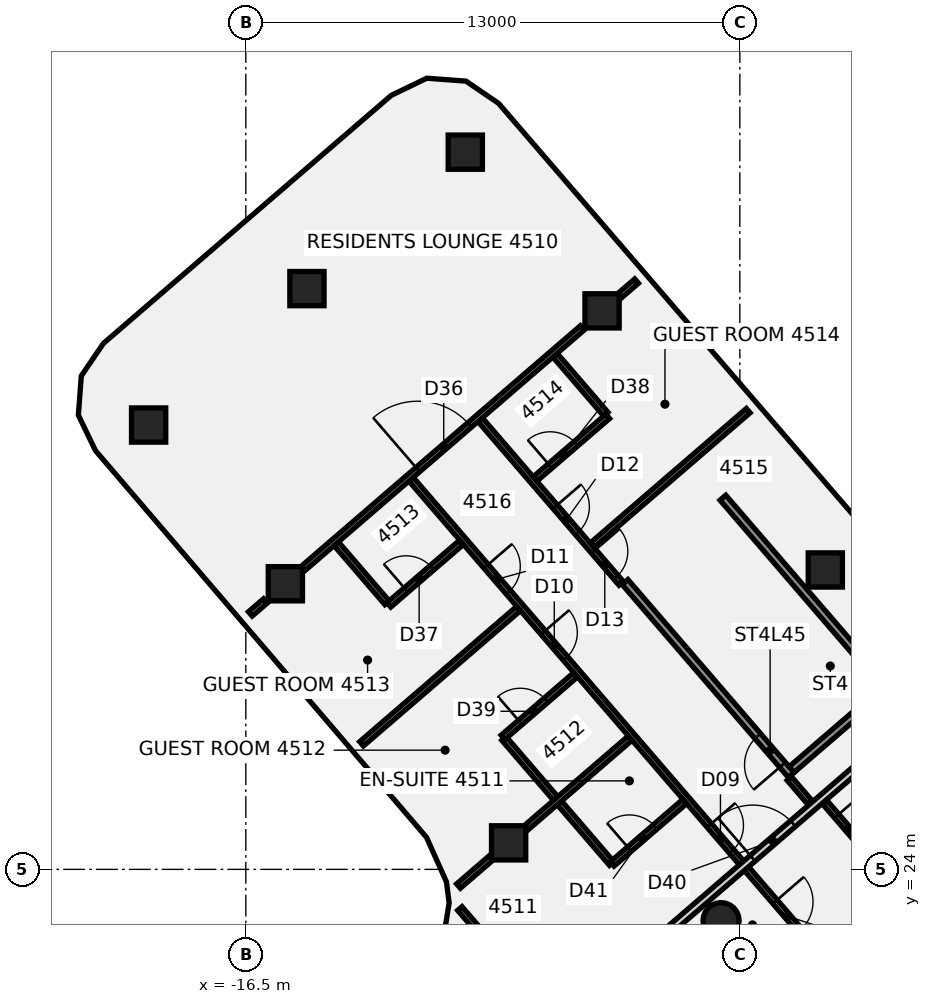
"""IFC4 building model, lengths in metres.
Left out: names, types, materials, properties, quantities, classifications, styles, units other than length and angle.
Written with IfcOpenShell. Run it as: python <this file> out.ifc"""

import sys

from ifc_helpers import new_model, si_unit, direction, frame, frame_2d, origin, origin_2d, place, context, subcontext, project, spatial, polyline, rectangle, circle, outline, extrude, element, fill, save


model = new_model("IFC4")
c1 = context("Model", 3, precision=1e-05, world=origin(), true_north=direction((0.0, 1.0)))
c2 = subcontext(c1, "Body", "Model", "MODEL_VIEW")
j1 = project(units=[si_unit("LENGTHUNIT", "METRE"), si_unit("PLANEANGLEUNIT", "RADIAN")], contexts=[c1])
p1 = place(None, origin())
s1 = spatial("IfcSite", under=j1, at=p1, CompositionType="ELEMENT")
p2 = place(p1, origin())
s2 = spatial("IfcBuilding", under=s1, at=p2, CompositionType="ELEMENT")
p3 = place(p2, frame((0.0, 0.0, 182.5)))
s3 = spatial("IfcBuildingStorey", under=s2, at=p3, CompositionType="ELEMENT", Elevation=182.5)
p4 = place(p3, frame((-3.994, 22.651, -0.14), z_axis=(0.0, 0.0, 1.0), x_axis=(1.0, 0.0, 0.0)))
e1 = element("IfcColumn", 1, at=p4, inside=s3, PredefinedType="COLUMN", context=c2, shape_type="SweptSolid", body=[
    extrude(circle(Radius=0.475, at=origin_2d()), origin(), (0.0, 0.0, 1.0), 3.6),
])
p5 = place(p3, frame((-15.459, 31.516, -0.133), z_axis=(-0.047319070379, -0.07839124964, 0.995799034725), x_axis=(0.755788776181, 0.649009542698, 0.087005398028)))
e2 = element("IfcColumn", 2, at=p5, inside=s3, PredefinedType="COLUMN", context=c2, shape_type="SweptSolid", body=[
    extrude(rectangle(XDim=0.9, YDim=0.9, at=origin_2d()), origin(), (0.0, 0.0, 1.0), 3.606),
])
p6 = place(p3, frame((-7.126, 38.696, -0.133), z_axis=(-0.083863399406, -0.036686006843, 0.995801720797), x_axis=(0.651508924479, -0.758162598415, 0.026936883435)))
e3 = element("IfcColumn", 3, at=p6, inside=s3, PredefinedType="COLUMN", context=c2, shape_type="SweptSolid", body=[
    extrude(rectangle(XDim=0.9, YDim=0.9, at=origin_2d()), origin(), (0.0, 0.0, 1.0), 3.607),
])
p7 = place(p3, frame((-9.584, 24.698, -0.135), z_axis=(-0.013229584391, -0.048576320124, 0.998731855515), x_axis=(0.757717932984, 0.651247732409, 0.04171240903)))
e4 = element("IfcColumn", 4, at=p7, inside=s3, PredefinedType="COLUMN", context=c2, shape_type="SweptSolid", body=[
    extrude(rectangle(XDim=0.9, YDim=0.9, at=origin_2d()), origin(), (0.0, 0.0, 1.0), 3.599),
])
p8 = place(p3, frame((-1.251, 31.878, -0.135), z_axis=(-0.049929700814, -0.006783926741, 0.99872969482), x_axis=(0.652013787216, -0.757710068374, 0.027449472935)))
e5 = element("IfcColumn", 5, at=p8, inside=s3, PredefinedType="COLUMN", context=c2, shape_type="SweptSolid", body=[
    extrude(rectangle(XDim=0.9, YDim=0.9, at=origin_2d()), origin(), (0.0, 0.0, 1.0), 3.599),
])
p9 = place(p3, frame((-10.725, 42.871, -0.125), z_axis=(-0.05897537844, -0.10577694023, 0.992639483223), x_axis=(0.75438904644, 0.6465033883, 0.113712512625)))
e6 = element("IfcColumn", 6, at=p9, inside=s3, PredefinedType="COLUMN", context=c2, shape_type="SweptSolid", body=[
    extrude(rectangle(XDim=0.9, YDim=0.9, at=origin_2d()), origin(), (0.0, 0.0, 1.0), 3.61),
])
p10 = place(p3, frame((-14.891, 39.281, -0.126), z_axis=(-0.040639705862, -0.12637463351, 0.99114976987), x_axis=(0.755269902041, 0.645550569996, 0.113277697048)))
e7 = element("IfcColumn", 7, at=p10, inside=s3, PredefinedType="COLUMN", context=c2, shape_type="SweptSolid", body=[
    extrude(rectangle(XDim=0.9, YDim=0.9, at=origin_2d()), origin(), (0.0, 0.0, 1.0), 3.616),
])
p11 = place(p3, frame((-19.058, 35.691, -0.128), z_axis=(-0.022351267372, -0.146831669094, 0.988908935038), x_axis=(0.756181261603, 0.644567349154, 0.112795531851)))
e8 = element("IfcColumn", 8, at=p11, inside=s3, PredefinedType="COLUMN", context=c2, shape_type="SweptSolid", body=[
    extrude(rectangle(XDim=0.9, YDim=0.9, at=origin_2d()), origin(), (0.0, 0.0, 1.0), 3.626),
])
p12 = place(p3, frame((-14.119, 32.565, 0.0), z_axis=(0.0, 0.0, 1.0), x_axis=(0.652696376995, -0.757619587562, 0.0)))
e9 = element("IfcWall", 9, at=p12, inside=s3, PredefinedType="PARTITIONING", context=c2, shape_type="SweptSolid", body=[
    extrude(rectangle(XDim=2.045, YDim=0.15, at=frame_2d((1.023, 0.0))), origin(), (0.0, 0.0, 1.0), 2.864),
])
p13 = place(p3, frame((-9.706, 27.443, 0.0), z_axis=(0.0, 0.0, 1.0), x_axis=(0.652665803923, -0.757645925475, 0.0)))
e10 = element("IfcWall", 10, at=p13, inside=s3, PredefinedType="PARTITIONING", context=c2, shape_type="SweptSolid", body=[
    extrude(rectangle(XDim=4.34, YDim=0.15, at=frame_2d((2.17, 0.0))), origin(), (0.0, 0.0, 1.0), 2.864),
])
p14 = place(p3, frame((-12.149, 34.262, 0.0), z_axis=(0.0, 0.0, 1.0), x_axis=(0.652651241908, -0.75765846952, 0.0)))
e11 = element("IfcWall", 11, at=p14, inside=s3, PredefinedType="PARTITIONING", context=c2, shape_type="SweptSolid", body=[
    extrude(rectangle(XDim=15.745, YDim=0.15, at=frame_2d((7.873, 0.0))), origin(), (0.0, 0.0, 1.0), 2.864),
])
p15 = place(p14, frame((14.67, 0.0, 0.0)))
e12 = element("IfcOpeningElement", 12, at=p15, cuts=e11, PredefinedType="OPENING", context=c2, shape_type="SweptSolid", body=[
    extrude(rectangle(XDim=1.0, YDim=2.1, at=frame_2d((0.5, 1.05))), frame((0.0, 0.085, 0.0), z_axis=(0.0, -1.0, 0.0), x_axis=(1.0, 0.0, 0.0)), (0.0, 0.0, 1.0), 0.17),
])
p16 = place(p14, frame((12.02, 0.0, 0.0)))
e13 = element("IfcOpeningElement", 13, at=p16, cuts=e11, PredefinedType="OPENING", context=c2, shape_type="SweptSolid", body=[
    extrude(rectangle(XDim=0.9, YDim=2.1, at=frame_2d((0.45, 1.05))), frame((0.0, 0.085, 0.0), z_axis=(0.0, -1.0, 0.0), x_axis=(1.0, 0.0, 0.0)), (0.0, 0.0, 1.0), 0.17),
])
p17 = place(p14, frame((5.32, 0.0, 0.0)))
e14 = element("IfcOpeningElement", 14, at=p17, cuts=e11, PredefinedType="OPENING", context=c2, shape_type="SweptSolid", body=[
    extrude(rectangle(XDim=0.9, YDim=2.1, at=frame_2d((0.45, 1.05))), frame((0.0, 0.085, 0.0), z_axis=(0.0, -1.0, 0.0), x_axis=(1.0, 0.0, 0.0)), (0.0, 0.0, 1.0), 0.17),
])
p18 = place(p14, frame((3.02, 0.0, 0.0)))
e15 = element("IfcOpeningElement", 15, at=p18, cuts=e11, PredefinedType="OPENING", context=c2, shape_type="SweptSolid", body=[
    extrude(rectangle(XDim=0.9, YDim=2.1, at=frame_2d((0.45, 1.05))), frame((0.0, 0.085, 0.0), z_axis=(0.0, -1.0, 0.0), x_axis=(1.0, 0.0, 0.0)), (0.0, 0.0, 1.0), 0.17),
])
p19 = place(p3, frame((-10.868, 22.97, 0.0), z_axis=(0.0, 0.0, 1.0), x_axis=(0.652748053076, -0.757575065063, 0.0)))
e16 = element("IfcWall", 16, at=p19, inside=s3, PredefinedType="PARTITIONING", context=c2, shape_type="SweptSolid", body=[
    extrude(rectangle(XDim=14.472, YDim=0.15, at=frame_2d((7.236, 0.0))), origin(), (0.0, 0.0, 1.0), 2.864),
])
p20 = place(p3, frame((-10.331, 35.829, 0.0), z_axis=(0.0, 0.0, 1.0), x_axis=(0.652721930007, -0.757597572652, 0.0)))
e17 = element("IfcWall", 17, at=p20, inside=s3, PredefinedType="PARTITIONING", context=c2, shape_type="SweptSolid", body=[
    extrude(rectangle(XDim=5.68, YDim=0.15, at=frame_2d((2.84, 0.0))), origin(), (0.0, 0.0, 1.0), 2.864),
])
p21 = place(p20, frame((3.02, 0.0, 0.0)))
e18 = element("IfcOpeningElement", 18, at=p21, cuts=e17, PredefinedType="OPENING", context=c2, shape_type="SweptSolid", body=[
    extrude(rectangle(XDim=0.9, YDim=2.1, at=frame_2d((0.45, 1.05))), frame((0.0, 0.085, 0.0), z_axis=(0.0, -1.0, 0.0), x_axis=(1.0, 0.0, 0.0)), (0.0, 0.0, 1.0), 0.17),
])
p22 = place(p20, frame((4.57, 0.0, 0.0)))
e19 = element("IfcOpeningElement", 19, at=p22, cuts=e17, PredefinedType="OPENING", context=c2, shape_type="SweptSolid", body=[
    extrude(rectangle(XDim=0.9, YDim=2.1, at=frame_2d((0.45, 1.05))), frame((0.0, 0.085, 0.0), z_axis=(0.0, -1.0, 0.0), x_axis=(1.0, 0.0, 0.0)), (0.0, 0.0, 1.0), 0.17),
])
p23 = place(p3, frame((-2.198, 26.39, 0.0), z_axis=(0.0, 0.0, 1.0), x_axis=(0.652726981175, -0.757593220697, 0.0)))
e20 = element("IfcWall", 20, at=p23, inside=s3, PredefinedType="PARTITIONING", context=c2, shape_type="SweptSolid", body=[
    extrude(rectangle(XDim=0.84, YDim=0.15, at=frame_2d((0.42, 0.0))), origin(), (0.0, 0.0, 1.0), 2.864),
])
p24 = place(p3, frame((-8.361, 37.526, 0.0), z_axis=(0.0, 0.0, 1.0), x_axis=(0.652696376995, -0.757619587562, 0.0)))
e21 = element("IfcWall", 21, at=p24, inside=s3, PredefinedType="PARTITIONING", context=c2, shape_type="SweptSolid", body=[
    extrude(rectangle(XDim=2.045, YDim=0.15, at=frame_2d((1.023, 0.0))), origin(), (0.0, 0.0, 1.0), 2.864),
])
p25 = place(p3, frame((-1.266, 25.767, 0.0), z_axis=(0.0, 0.0, 1.0), x_axis=(0.652880885414, -0.757460592679, 0.0)))
e22 = element("IfcWall", 22, at=p25, inside=s3, PredefinedType="PARTITIONING", context=c2, shape_type="SweptSolid", body=[
    extrude(rectangle(XDim=2.22, YDim=0.15, at=frame_2d((1.11, 0.0))), origin(), (0.0, 0.0, 1.0), 2.864),
])
p26 = place(p25, frame((0.48, 0.0, 0.0)))
e23 = element("IfcOpeningElement", 23, at=p26, cuts=e22, PredefinedType="OPENING", context=c2, shape_type="SweptSolid", body=[
    extrude(rectangle(XDim=0.9, YDim=2.1, at=frame_2d((0.45, 1.05))), frame((0.0, 0.085, 0.0), z_axis=(0.0, -1.0, 0.0), x_axis=(1.0, 0.0, 0.0)), (0.0, 0.0, 1.0), 0.17),
])
p27 = place(p3, frame((-16.381, 30.722, 0.0), z_axis=(0.0, 0.0, 1.0), x_axis=(0.757409961601, 0.652939622069, 0.0)))
e24 = element("IfcWall", 24, at=p27, inside=s3, PredefinedType="PARTITIONING", context=c2, shape_type="SweptSolid", body=[
    extrude(rectangle(XDim=0.523, YDim=0.15, at=frame_2d((0.262, 0.0))), origin(), (0.0, 0.0, 1.0), 2.864),
])
p28 = place(p3, frame((-15.177, 31.759, 0.0), z_axis=(0.0, 0.0, 1.0), x_axis=(0.757593369708, 0.652726808224, 0.0)))
e25 = element("IfcWall", 25, at=p28, inside=s3, PredefinedType="PARTITIONING", context=c2, shape_type="SweptSolid", body=[
    extrude(rectangle(XDim=9.941, YDim=0.15, at=frame_2d((4.97, 0.0))), origin(), (0.0, 0.0, 1.0), 2.864),
])
p29 = place(p28, frame((4.229, 0.0, 0.0)))
e26 = element("IfcOpeningElement", 26, at=p29, cuts=e25, PredefinedType="OPENING", context=c2, shape_type="SweptSolid", body=[
    extrude(rectangle(XDim=1.8, YDim=2.1, at=frame_2d((0.9, 1.05))), frame((0.0, 0.085, 0.0), z_axis=(0.0, -1.0, 0.0), x_axis=(1.0, 0.0, 0.0)), (0.0, 0.0, 1.0), 0.17),
])
p30 = place(p3, frame((-6.839, 38.943, 0.0), z_axis=(0.0, 0.0, 1.0), x_axis=(0.757658475541, 0.652651234918, 0.0)))
e27 = element("IfcWall", 27, at=p30, inside=s3, PredefinedType="PARTITIONING", context=c2, shape_type="SweptSolid", body=[
    extrude(rectangle(XDim=0.821, YDim=0.15, at=frame_2d((0.41, 0.0))), origin(), (0.0, 0.0, 1.0), 2.864),
])
p31 = place(p3, frame((-13.455, 27.303, 0.0), z_axis=(0.0, 0.0, 1.0), x_axis=(0.757581773841, 0.652740266832, 0.0)))
e28 = element("IfcWall", 28, at=p31, inside=s3, PredefinedType="PARTITIONING", context=c2, shape_type="SweptSolid", body=[
    extrude(rectangle(XDim=5.451, YDim=0.15, at=frame_2d((2.726, 0.0))), origin(), (0.0, 0.0, 1.0), 2.864),
])
p32 = place(p3, frame((-7.385, 32.533, 0.0), z_axis=(0.0, 0.0, 1.0), x_axis=(0.757581269408, 0.652740852286, 0.0)))
e29 = element("IfcWall", 29, at=p32, inside=s3, PredefinedType="PARTITIONING", context=c2, shape_type="SweptSolid", body=[
    extrude(rectangle(XDim=5.419, YDim=0.15, at=frame_2d((2.709, 0.0))), origin(), (0.0, 0.0, 1.0), 2.864),
])
p33 = place(p3, frame((-12.735, 30.959, 0.0), z_axis=(0.0, 0.0, 1.0), x_axis=(0.757661014591, 0.652648287341, 0.0)))
e30 = element("IfcWall", 30, at=p33, inside=s3, PredefinedType="PARTITIONING", context=c2, shape_type="SweptSolid", body=[
    extrude(rectangle(XDim=2.52, YDim=0.15, at=frame_2d((1.26, 0.0))), origin(), (0.0, 0.0, 1.0), 2.864),
])
p34 = place(p33, frame((0.6, 0.0, 0.0)))
e31 = element("IfcOpeningElement", 31, at=p34, cuts=e30, PredefinedType="OPENING", context=c2, shape_type="SweptSolid", body=[
    extrude(rectangle(XDim=0.9, YDim=2.1, at=frame_2d((0.45, 1.05))), frame((0.0, 0.085, 0.0), z_axis=(0.0, -1.0, 0.0), x_axis=(1.0, 0.0, 0.0)), (0.0, 0.0, 1.0), 0.17),
])
p35 = place(p3, frame((-8.886, 34.275, 0.0), z_axis=(0.0, 0.0, 1.0), x_axis=(0.757661014591, 0.652648287341, 0.0)))
e32 = element("IfcWall", 32, at=p35, inside=s3, PredefinedType="PARTITIONING", context=c2, shape_type="SweptSolid", body=[
    extrude(rectangle(XDim=2.52, YDim=0.15, at=frame_2d((1.26, 0.0))), origin(), (0.0, 0.0, 1.0), 2.864),
])
p36 = place(p35, frame((0.52, 0.0, 0.0)))
e33 = element("IfcOpeningElement", 33, at=p36, cuts=e32, PredefinedType="OPENING", context=c2, shape_type="SweptSolid", body=[
    extrude(rectangle(XDim=0.9, YDim=2.1, at=frame_2d((0.45, 1.05))), frame((0.0, 0.085, 0.0), z_axis=(0.0, -1.0, 0.0), x_axis=(1.0, 0.0, 0.0)), (0.0, 0.0, 1.0), 0.17),
])
p37 = place(p3, frame((-10.904, 23.561, 0.0), z_axis=(0.0, 0.0, 1.0), x_axis=(0.757575802877, 0.652747196773, 0.0)))
e34 = element("IfcWall", 34, at=p37, inside=s3, PredefinedType="PARTITIONING", context=c2, shape_type="SweptSolid", body=[
    extrude(rectangle(XDim=1.13, YDim=0.15, at=frame_2d((0.565, 0.0))), origin(), (0.0, 0.0, 1.0), 2.864),
])
p38 = place(p3, frame((-9.24, 24.994, 0.0), z_axis=(0.0, 0.0, 1.0), x_axis=(0.757602279322, 0.652716467056, 0.0)))
e35 = element("IfcWall", 35, at=p38, inside=s3, PredefinedType="PARTITIONING", context=c2, shape_type="SweptSolid", body=[
    extrude(rectangle(XDim=3.766, YDim=0.15, at=frame_2d((1.883, 0.0))), origin(), (0.0, 0.0, 1.0), 2.864),
])
p39 = place(p3, frame((-9.732, 27.474, 0.0), z_axis=(0.0, 0.0, 1.0), x_axis=(0.757495885979, 0.652839936528, 0.0)))
e36 = element("IfcWall", 36, at=p39, inside=s3, PredefinedType="PARTITIONING", context=c2, shape_type="SweptSolid", body=[
    extrude(rectangle(XDim=2.52, YDim=0.15, at=frame_2d((1.26, 0.0))), origin(), (0.0, 0.0, 1.0), 2.864),
])
p40 = place(p39, frame((0.6, 0.0, 0.0)))
e37 = element("IfcOpeningElement", 37, at=p40, cuts=e36, PredefinedType="OPENING", context=c2, shape_type="SweptSolid", body=[
    extrude(rectangle(XDim=0.9, YDim=2.1, at=frame_2d((0.45, 1.05))), frame((0.0, 0.085, 0.0), z_axis=(0.0, -1.0, 0.0), x_axis=(1.0, 0.0, 0.0)), (0.0, 0.0, 1.0), 0.17),
])
p41 = place(p3, frame((-8.177, 19.97, 0.0), z_axis=(0.0, 0.0, 1.0), x_axis=(0.757604641141, 0.652713725704, 0.0)))
e38 = element("IfcWall", 38, at=p41, inside=s3, PredefinedType="PARTITIONING", context=c2, shape_type="SweptSolid", body=[
    extrude(rectangle(XDim=14.219, YDim=0.2, at=frame_2d((7.109, 0.0))), origin(), (0.0, 0.0, 1.0), 2.864),
])
p42 = place(p41, frame((6.621, 0.0, 0.0)))
e39 = element("IfcOpeningElement", 39, at=p42, cuts=e38, PredefinedType="OPENING", context=c2, shape_type="SweptSolid", body=[
    extrude(rectangle(XDim=1.4, YDim=2.1, at=frame_2d((0.7, 1.05))), frame((0.0, 0.11, 0.0), z_axis=(0.0, -1.0, 0.0), x_axis=(1.0, 0.0, 0.0)), (0.0, 0.0, 1.0), 0.22),
])
p43 = place(p3, frame((-6.86, 24.141, 0.0), z_axis=(0.0, 0.0, 1.0), x_axis=(0.757495885979, 0.652839936528, 0.0)))
e40 = element("IfcWall", 40, at=p43, inside=s3, PredefinedType="PARTITIONING", context=c2, shape_type="SweptSolid", body=[
    extrude(rectangle(XDim=2.52, YDim=0.15, at=frame_2d((1.26, 0.0))), origin(), (0.0, 0.0, 1.0), 2.864),
])
p44 = place(p43, frame((0.6, 0.0, 0.0)))
e41 = element("IfcOpeningElement", 41, at=p44, cuts=e40, PredefinedType="OPENING", context=c2, shape_type="SweptSolid", body=[
    extrude(rectangle(XDim=0.9, YDim=2.1, at=frame_2d((0.45, 1.05))), frame((0.0, 0.085, 0.0), z_axis=(0.0, -1.0, 0.0), x_axis=(1.0, 0.0, 0.0)), (0.0, 0.0, 1.0), 0.17),
])
p45 = place(p3, frame((-2.148, 26.485, -0.14), z_axis=(0.0, 0.0, 1.0), x_axis=(-0.6527428112, 0.75757958158, 0.0)))
e42 = element("IfcWall", 42, at=p45, inside=s3, PredefinedType="SHEAR", context=c2, shape_type="SweptSolid", body=[
    extrude(rectangle(XDim=6.7, YDim=0.2, at=frame_2d((3.35, 0.0))), origin(), (0.0, 0.0, 1.0), 3.004),
])
p46 = place(p45, frame((0.35, 0.0, 0.0)))
e43 = element("IfcOpeningElement", 43, at=p46, cuts=e42, PredefinedType="OPENING", context=c2, shape_type="SweptSolid", body=[
    extrude(rectangle(XDim=1.0, YDim=2.1, at=frame_2d((0.5, 1.05))), frame((0.0, 0.11, 0.0), z_axis=(0.0, -1.0, 0.0), x_axis=(1.0, 0.0, 0.0)), (0.0, 0.0, 1.0), 0.22),
])
p47 = place(p3, frame((0.427, 28.704, -0.14), z_axis=(0.0, 0.0, 1.0), x_axis=(-0.652703877257, 0.757613125952, 0.0)))
e44 = element("IfcWall", 44, at=p47, inside=s3, PredefinedType="SHEAR", context=c2, shape_type="SweptSolid", body=[
    extrude(rectangle(XDim=6.7, YDim=0.2, at=frame_2d((3.35, 0.0))), origin(), (0.0, 0.0, 1.0), 3.004),
])
p48 = place(p3, frame((0.287, 28.715, -0.14), z_axis=(0.0, 0.0, 1.0), x_axis=(-0.757611592596, -0.652705657065, 0.0)))
e45 = element("IfcWall", 45, at=p48, inside=s3, PredefinedType="SHEAR", context=c2, shape_type="SweptSolid", body=[
    extrude(rectangle(XDim=3.2, YDim=0.2, at=frame_2d((1.6, 0.0))), origin(), (0.0, 0.0, 1.0), 3.004),
])
p49 = place(p3, frame((0.0, 0.0, -0.14)))
e46 = element("IfcWall", 46, at=p49, inside=s3, PredefinedType="SHEAR", context=c2, shape_type="SweptSolid", body=[
    extrude(outline(polyline([(-3.891, 33.563), (-4.021, 33.715), (-6.446, 31.626), (-6.315, 31.475), (-3.891, 33.563)])), origin(), (0.0, 0.0, 1.0), 3.004),
])
p50 = place(p15, frame((1.0, 0.0, 0.0), z_axis=(0.0, 0.0, 1.0), x_axis=(-1.0, 0.0, 0.0)))
e47 = element("IfcDoor", 47, at=p50, inside=s3, OperationType="SINGLE_SWING_RIGHT", PredefinedType="DOOR", context=c2, shape_type="SweptSolid", body=[
    extrude(rectangle(XDim=1.0, YDim=2.1, at=frame_2d((0.5, 1.05))), frame((0.0, 0.025, 0.0), z_axis=(0.0, -1.0, 0.0), x_axis=(1.0, 0.0, 0.0)), (0.0, 0.0, 1.0), 0.05),
])
fill(e12, e47)
p51 = place(p16, frame((0.9, 0.0, 0.0), z_axis=(0.0, 0.0, 1.0), x_axis=(-1.0, 0.0, 0.0)))
e48 = element("IfcDoor", 48, at=p51, inside=s3, OperationType="SINGLE_SWING_RIGHT", PredefinedType="DOOR", context=c2, shape_type="SweptSolid", body=[
    extrude(rectangle(XDim=0.9, YDim=2.1, at=frame_2d((0.45, 1.05))), frame((0.0, 0.025, 0.0), z_axis=(0.0, -1.0, 0.0), x_axis=(1.0, 0.0, 0.0)), (0.0, 0.0, 1.0), 0.05),
])
fill(e13, e48)
p52 = place(p17, frame((0.9, 0.0, 0.0), z_axis=(0.0, 0.0, 1.0), x_axis=(-1.0, 0.0, 0.0)))
e49 = element("IfcDoor", 49, at=p52, inside=s3, OperationType="SINGLE_SWING_LEFT", PredefinedType="DOOR", context=c2, shape_type="SweptSolid", body=[
    extrude(rectangle(XDim=0.9, YDim=2.1, at=frame_2d((0.45, 1.05))), frame((0.0, 0.025, 0.0), z_axis=(0.0, -1.0, 0.0), x_axis=(1.0, 0.0, 0.0)), (0.0, 0.0, 1.0), 0.05),
])
fill(e14, e49)
p53 = place(p18, frame((0.9, 0.0, 0.0), z_axis=(0.0, 0.0, 1.0), x_axis=(-1.0, 0.0, 0.0)))
e50 = element("IfcDoor", 50, at=p53, inside=s3, OperationType="SINGLE_SWING_LEFT", PredefinedType="DOOR", context=c2, shape_type="SweptSolid", body=[
    extrude(rectangle(XDim=0.9, YDim=2.1, at=frame_2d((0.45, 1.05))), frame((0.0, 0.025, 0.0), z_axis=(0.0, -1.0, 0.0), x_axis=(1.0, 0.0, 0.0)), (0.0, 0.0, 1.0), 0.05),
])
fill(e15, e50)
p54 = place(p21, origin())
e51 = element("IfcDoor", 51, at=p54, inside=s3, OperationType="SINGLE_SWING_LEFT", PredefinedType="DOOR", context=c2, shape_type="SweptSolid", body=[
    extrude(rectangle(XDim=0.9, YDim=2.1, at=frame_2d((0.45, 1.05))), frame((0.0, 0.025, 0.0), z_axis=(0.0, -1.0, 0.0), x_axis=(1.0, 0.0, 0.0)), (0.0, 0.0, 1.0), 0.05),
])
fill(e18, e51)
p55 = place(p22, origin())
e52 = element("IfcDoor", 52, at=p55, inside=s3, OperationType="SINGLE_SWING_LEFT", PredefinedType="DOOR", context=c2, shape_type="SweptSolid", body=[
    extrude(rectangle(XDim=0.9, YDim=2.1, at=frame_2d((0.45, 1.05))), frame((0.0, 0.025, 0.0), z_axis=(0.0, -1.0, 0.0), x_axis=(1.0, 0.0, 0.0)), (0.0, 0.0, 1.0), 0.05),
])
fill(e19, e52)
p56 = place(p26, origin())
e53 = element("IfcDoor", 53, at=p56, inside=s3, OperationType="SINGLE_SWING_RIGHT", PredefinedType="DOOR", context=c2, shape_type="SweptSolid", body=[
    extrude(rectangle(XDim=0.9, YDim=2.1, at=frame_2d((0.45, 1.05))), frame((0.0, 0.025, 0.0), z_axis=(0.0, -1.0, 0.0), x_axis=(1.0, 0.0, 0.0)), (0.0, 0.0, 1.0), 0.05),
])
fill(e23, e53)
p57 = place(p29, origin())
e54 = element("IfcDoor", 54, at=p57, inside=s3, OperationType="DOUBLE_DOOR_SINGLE_SWING", PredefinedType="DOOR", context=c2, shape_type="SweptSolid", body=[
    extrude(rectangle(XDim=1.8, YDim=2.1, at=frame_2d((0.9, 1.05))), frame((0.0, 0.025, 0.0), z_axis=(0.0, -1.0, 0.0), x_axis=(1.0, 0.0, 0.0)), (0.0, 0.0, 1.0), 0.05),
])
fill(e26, e54)
p58 = place(p34, origin())
e55 = element("IfcDoor", 55, at=p58, inside=s3, OperationType="SINGLE_SWING_RIGHT", PredefinedType="DOOR", context=c2, shape_type="SweptSolid", body=[
    extrude(rectangle(XDim=0.9, YDim=2.1, at=frame_2d((0.45, 1.05))), frame((0.0, 0.025, 0.0), z_axis=(0.0, -1.0, 0.0), x_axis=(1.0, 0.0, 0.0)), (0.0, 0.0, 1.0), 0.05),
])
fill(e31, e55)
p59 = place(p36, origin())
e56 = element("IfcDoor", 56, at=p59, inside=s3, OperationType="SINGLE_SWING_RIGHT", PredefinedType="DOOR", context=c2, shape_type="SweptSolid", body=[
    extrude(rectangle(XDim=0.9, YDim=2.1, at=frame_2d((0.45, 1.05))), frame((0.0, 0.025, 0.0), z_axis=(0.0, -1.0, 0.0), x_axis=(1.0, 0.0, 0.0)), (0.0, 0.0, 1.0), 0.05),
])
fill(e33, e56)
p60 = place(p40, frame((0.9, 0.0, 0.0), z_axis=(0.0, 0.0, 1.0), x_axis=(-1.0, 0.0, 0.0)))
e57 = element("IfcDoor", 57, at=p60, inside=s3, OperationType="SINGLE_SWING_LEFT", PredefinedType="DOOR", context=c2, shape_type="SweptSolid", body=[
    extrude(rectangle(XDim=0.9, YDim=2.1, at=frame_2d((0.45, 1.05))), frame((0.0, 0.025, 0.0), z_axis=(0.0, -1.0, 0.0), x_axis=(1.0, 0.0, 0.0)), (0.0, 0.0, 1.0), 0.05),
])
fill(e37, e57)
p61 = place(p42, frame((1.4, 0.0, 0.0), z_axis=(0.0, 0.0, 1.0), x_axis=(-1.0, 0.0, 0.0)))
e58 = element("IfcDoor", 58, at=p61, inside=s3, OperationType="DOUBLE_DOOR_SINGLE_SWING", PredefinedType="DOOR", context=c2, shape_type="SweptSolid", body=[
    extrude(rectangle(XDim=1.4, YDim=2.1, at=frame_2d((0.7, 1.05))), frame((0.0, 0.025, 0.0), z_axis=(0.0, -1.0, 0.0), x_axis=(1.0, 0.0, 0.0)), (0.0, 0.0, 1.0), 0.05),
])
fill(e39, e58)
p62 = place(p44, origin())
e59 = element("IfcDoor", 59, at=p62, inside=s3, OperationType="SINGLE_SWING_RIGHT", PredefinedType="DOOR", context=c2, shape_type="SweptSolid", body=[
    extrude(rectangle(XDim=0.9, YDim=2.1, at=frame_2d((0.45, 1.05))), frame((0.0, 0.025, 0.0), z_axis=(0.0, -1.0, 0.0), x_axis=(1.0, 0.0, 0.0)), (0.0, 0.0, 1.0), 0.05),
])
fill(e41, e59)
p63 = place(p46, origin())
e60 = element("IfcDoor", 60, at=p63, inside=s3, OperationType="SINGLE_SWING_LEFT", PredefinedType="DOOR", context=c2, shape_type="SweptSolid", body=[
    extrude(rectangle(XDim=1.0, YDim=2.1, at=frame_2d((0.5, 1.05))), frame((0.0, 0.025, 0.0), z_axis=(0.0, -1.0, 0.0), x_axis=(1.0, 0.0, 0.0)), (0.0, 0.0, 1.0), 0.05),
])
fill(e43, e60)
save(model, sys.argv[1])
